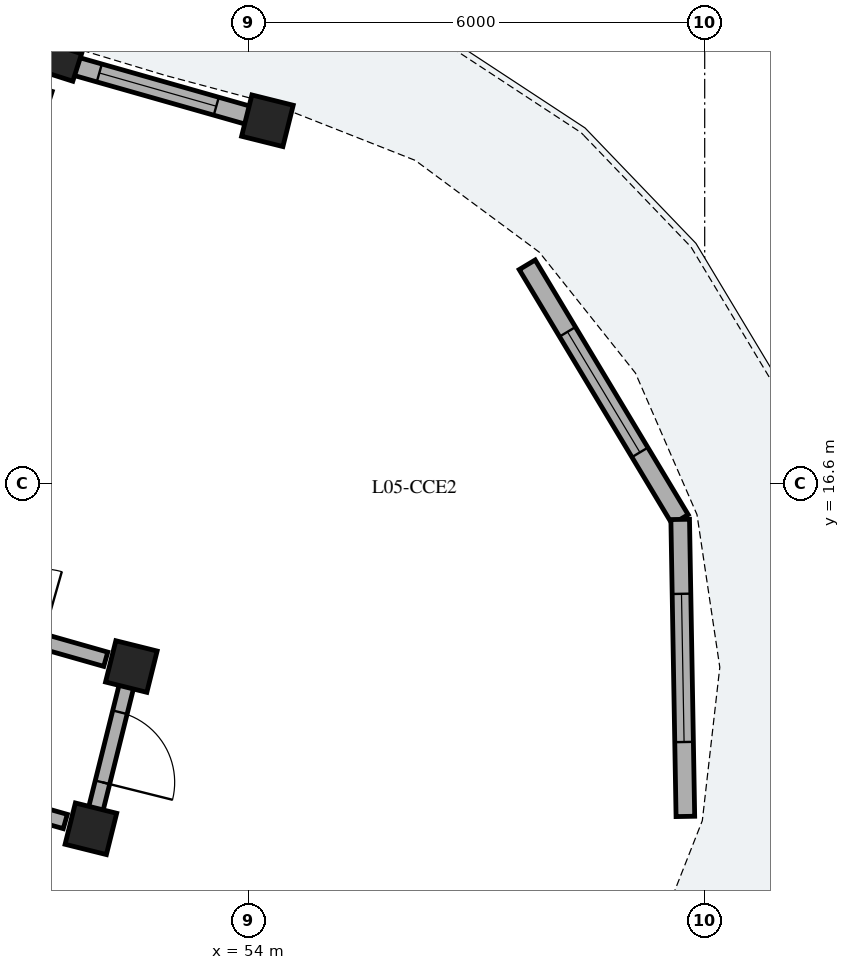
"""IFC4 building model, lengths in metres.
Left out: names, types, materials, properties, quantities, classifications, styles, units other than length and angle.
Written with IfcOpenShell. Run it as: python <this file> out.ifc"""

import sys

from ifc_helpers import new_model, si_unit, direction, frame, frame_2d, origin, origin_2d, place, context, subcontext, project, spatial, rectangle, extrude, element, fill, save


model = new_model("IFC4")
c1 = context("Model", 3, precision=1e-05, world=origin(), true_north=direction((0.0, 1.0)))
c2 = subcontext(c1, "Body", "Model", "MODEL_VIEW")
j1 = project(units=[si_unit("LENGTHUNIT", "METRE"), si_unit("PLANEANGLEUNIT", "RADIAN")], contexts=[c1])
p1 = place(None, origin())
s1 = spatial("IfcSite", under=j1, at=p1, CompositionType="ELEMENT")
p2 = place(p1, origin())
s2 = spatial("IfcBuilding", under=s1, at=p2, CompositionType="ELEMENT")
p3 = place(p2, frame((0.0, 0.0, 18.92)))
s3 = spatial("IfcBuildingStorey", under=s2, at=p3, CompositionType="ELEMENT", Elevation=18.92)
p4 = place(p3, frame((51.449, 22.166, 0.0), z_axis=(0.0, 0.0, 1.0), x_axis=(-0.304864299028, -0.952395799643, 0.0)))
e1 = element("IfcColumn", 1, at=p4, inside=s3, PredefinedType="PILASTER", context=c2, shape_type="SweptSolid", body=[
    extrude(rectangle(XDim=0.38, YDim=0.62, at=origin_2d()), origin(), (0.0, 0.0, 1.0), 3.11),
])
for number, where, z_axis, x_axis in (
    (2, (54.247, 21.37, 0.0), (0.0, 0.0, 1.0), (-0.242, -0.97, 0.0)),
    (3, (52.456, 14.19, 0.0), (0.0, 0.0, 1.0), (-0.242, -0.97, 0.0)),
    (4, (51.924, 12.055, 0.0), (0.0, 0.0, 1.0), (-0.242, -0.97, 0.0)),
):
    element("IfcColumn", number, at=place(p3, frame(where, z_axis=z_axis, x_axis=x_axis)), inside=s3, PredefinedType="COLUMN", context=c2, shape_type="SweptSolid", body=[
        extrude(rectangle(XDim=0.56, YDim=0.56, at=origin_2d()), origin(), (0.0, 0.0, 1.0), 3.11),
    ])
p5 = place(p3, frame((51.603, 22.122, 0.0), z_axis=(0.0, 0.0, 1.0), x_axis=(0.961847744742, -0.273585299195, 0.0)))
e5 = element("IfcWall", 5, at=p5, inside=s3, PredefinedType="SOLIDWALL", context=c2, shape_type="SweptSolid", body=[
    extrude(rectangle(XDim=2.499, YDim=0.245, at=frame_2d((1.249, 0.0))), origin(), (0.0, 0.0, 1.0), 2.355),
])
p6 = place(p5, frame((0.449, 0.0, 0.55)))
e6 = element("IfcOpeningElement", 6, at=p6, cuts=e5, PredefinedType="OPENING", context=c2, shape_type="SweptSolid", body=[
    extrude(rectangle(XDim=1.6, YDim=1.535, at=frame_2d((0.8, 0.768))), frame((0.0, 0.133, 0.0), z_axis=(0.0, -1.0, 0.0), x_axis=(1.0, 0.0, 0.0)), (0.0, 0.0, 1.0), 0.265),
])
p7 = place(p3, frame((57.665, 19.476, 0.0), z_axis=(0.0, 0.0, 1.0), x_axis=(0.515019321998, -0.857178568309, 0.0)))
e7 = element("IfcWall", 7, at=p7, inside=s3, PredefinedType="SOLIDWALL", context=c2, shape_type="SweptSolid", body=[
    extrude(rectangle(XDim=3.908, YDim=0.245, at=frame_2d((1.954, 0.0))), origin(), (0.0, 0.0, 1.0), 2.355),
])
p8 = place(p7, frame((1.029, 0.0, 0.4)))
e8 = element("IfcOpeningElement", 8, at=p8, cuts=e7, PredefinedType="OPENING", context=c2, shape_type="SweptSolid", body=[
    extrude(rectangle(XDim=1.85, YDim=1.72, at=frame_2d((0.925, 0.86))), frame((0.0, 0.133, 0.0), z_axis=(0.0, -1.0, 0.0), x_axis=(1.0, 0.0, 0.0)), (0.0, 0.0, 1.0), 0.265),
])
p9 = place(p3, frame((59.677, 16.126, 0.0), z_axis=(0.0, 0.0, 1.0), x_axis=(0.017490763899, -0.999847024888, 0.0)))
e9 = element("IfcWall", 9, at=p9, inside=s3, PredefinedType="SOLIDWALL", context=c2, shape_type="SweptSolid", body=[
    extrude(rectangle(XDim=3.908, YDim=0.245, at=frame_2d((1.954, 0.0))), origin(), (0.0, 0.0, 1.0), 2.355),
])
p10 = place(p9, frame((0.979, 0.0, 0.4)))
e10 = element("IfcOpeningElement", 10, at=p10, cuts=e9, PredefinedType="OPENING", context=c2, shape_type="SweptSolid", body=[
    extrude(rectangle(XDim=1.95, YDim=1.78, at=frame_2d((0.975, 0.89))), frame((0.0, 0.133, 0.0), z_axis=(0.0, -1.0, 0.0), x_axis=(1.0, 0.0, 0.0)), (0.0, 0.0, 1.0), 0.265),
])
p11 = place(p3, frame((48.859, 12.927, 0.0), z_axis=(0.0, 0.0, 1.0), x_axis=(0.961873892319, -0.273493355085, 0.0)))
e11 = element("IfcWall", 11, at=p11, inside=s3, PredefinedType="PARTITIONING", context=c2, shape_type="SweptSolid", body=[
    extrude(rectangle(XDim=2.837, YDim=0.195, at=frame_2d((1.418, 0.0))), origin(), (0.0, 0.0, 1.0), 2.37),
])
p12 = place(p11, frame((0.944, 0.0, 0.0)))
e12 = element("IfcOpeningElement", 12, at=p12, cuts=e11, PredefinedType="OPENING", context=c2, shape_type="SweptSolid", body=[
    extrude(rectangle(XDim=0.95, YDim=2.13, at=frame_2d((0.475, 1.065))), frame((0.0, 0.107, 0.0), z_axis=(0.0, -1.0, 0.0), x_axis=(1.0, 0.0, 0.0)), (0.0, 0.0, 1.0), 0.215),
])
p13 = place(p3, frame((49.53, 15.022, 0.0), z_axis=(0.0, 0.0, 1.0), x_axis=(0.961861926514, -0.273535435224, 0.0)))
e13 = element("IfcWall", 13, at=p13, inside=s3, PredefinedType="PARTITIONING", context=c2, shape_type="SweptSolid", body=[
    extrude(rectangle(XDim=2.693, YDim=0.195, at=frame_2d((1.346, 0.0))), origin(), (0.0, 0.0, 1.0), 2.37),
])
p14 = place(p13, frame((0.872, 0.0, 0.0)))
e14 = element("IfcOpeningElement", 14, at=p14, cuts=e13, PredefinedType="OPENING", context=c2, shape_type="SweptSolid", body=[
    extrude(rectangle(XDim=0.95, YDim=2.13, at=frame_2d((0.475, 1.065))), frame((0.0, 0.107, 0.0), z_axis=(0.0, -1.0, 0.0), x_axis=(1.0, 0.0, 0.0)), (0.0, 0.0, 1.0), 0.215),
])
p15 = place(p3, frame((52.444, 14.142, 0.0), z_axis=(0.0, 0.0, 1.0), x_axis=(-0.241933770084, -0.970292765557, 0.0)))
e15 = element("IfcWall", 15, at=p15, inside=s3, PredefinedType="PARTITIONING", context=c2, shape_type="SweptSolid", body=[
    extrude(rectangle(XDim=2.1, YDim=0.195, at=frame_2d((1.05, 0.0))), origin(), (0.0, 0.0, 1.0), 2.37),
])
p16 = place(p15, frame((0.57, 0.0, 0.0)))
e16 = element("IfcOpeningElement", 16, at=p16, cuts=e15, PredefinedType="OPENING", context=c2, shape_type="SweptSolid", body=[
    extrude(rectangle(XDim=0.95, YDim=2.13, at=frame_2d((0.475, 1.065))), frame((0.0, 0.107, 0.0), z_axis=(0.0, -1.0, 0.0), x_axis=(1.0, 0.0, 0.0)), (0.0, 0.0, 1.0), 0.215),
])
p17 = place(p6, origin())
e17 = element("IfcWindow", 17, at=p17, inside=s3, PartitioningType="SINGLE_PANEL", PredefinedType="WINDOW", context=c2, shape_type="SweptSolid", body=[
    extrude(rectangle(XDim=1.6, YDim=1.535, at=frame_2d((0.8, 0.768))), frame((0.0, 0.03, 0.0), z_axis=(0.0, -1.0, 0.0), x_axis=(1.0, 0.0, 0.0)), (0.0, 0.0, 1.0), 0.06),
])
fill(e6, e17)
p18 = place(p8, origin())
e18 = element("IfcWindow", 18, at=p18, inside=s3, PartitioningType="SINGLE_PANEL", PredefinedType="WINDOW", context=c2, shape_type="SweptSolid", body=[
    extrude(rectangle(XDim=1.85, YDim=1.72, at=frame_2d((0.925, 0.86))), frame((0.0, 0.03, 0.0), z_axis=(0.0, -1.0, 0.0), x_axis=(1.0, 0.0, 0.0)), (0.0, 0.0, 1.0), 0.06),
])
fill(e8, e18)
p19 = place(p10, origin())
e19 = element("IfcWindow", 19, at=p19, inside=s3, PartitioningType="SINGLE_PANEL", PredefinedType="WINDOW", context=c2, shape_type="SweptSolid", body=[
    extrude(rectangle(XDim=1.95, YDim=1.78, at=frame_2d((0.975, 0.89))), frame((0.0, 0.03, 0.0), z_axis=(0.0, -1.0, 0.0), x_axis=(1.0, 0.0, 0.0)), (0.0, 0.0, 1.0), 0.06),
])
fill(e10, e19)
p20 = place(p16, origin())
e20 = element("IfcDoor", 20, at=p20, inside=s3, OperationType="SINGLE_SWING_RIGHT", PredefinedType="DOOR", context=c2, shape_type="SweptSolid", body=[
    extrude(rectangle(XDim=0.95, YDim=2.13, at=frame_2d((0.475, 1.065))), frame((0.0, 0.025, 0.0), z_axis=(0.0, -1.0, 0.0), x_axis=(1.0, 0.0, 0.0)), (0.0, 0.0, 1.0), 0.05),
])
fill(e16, e20)
save(model, sys.argv[1])
